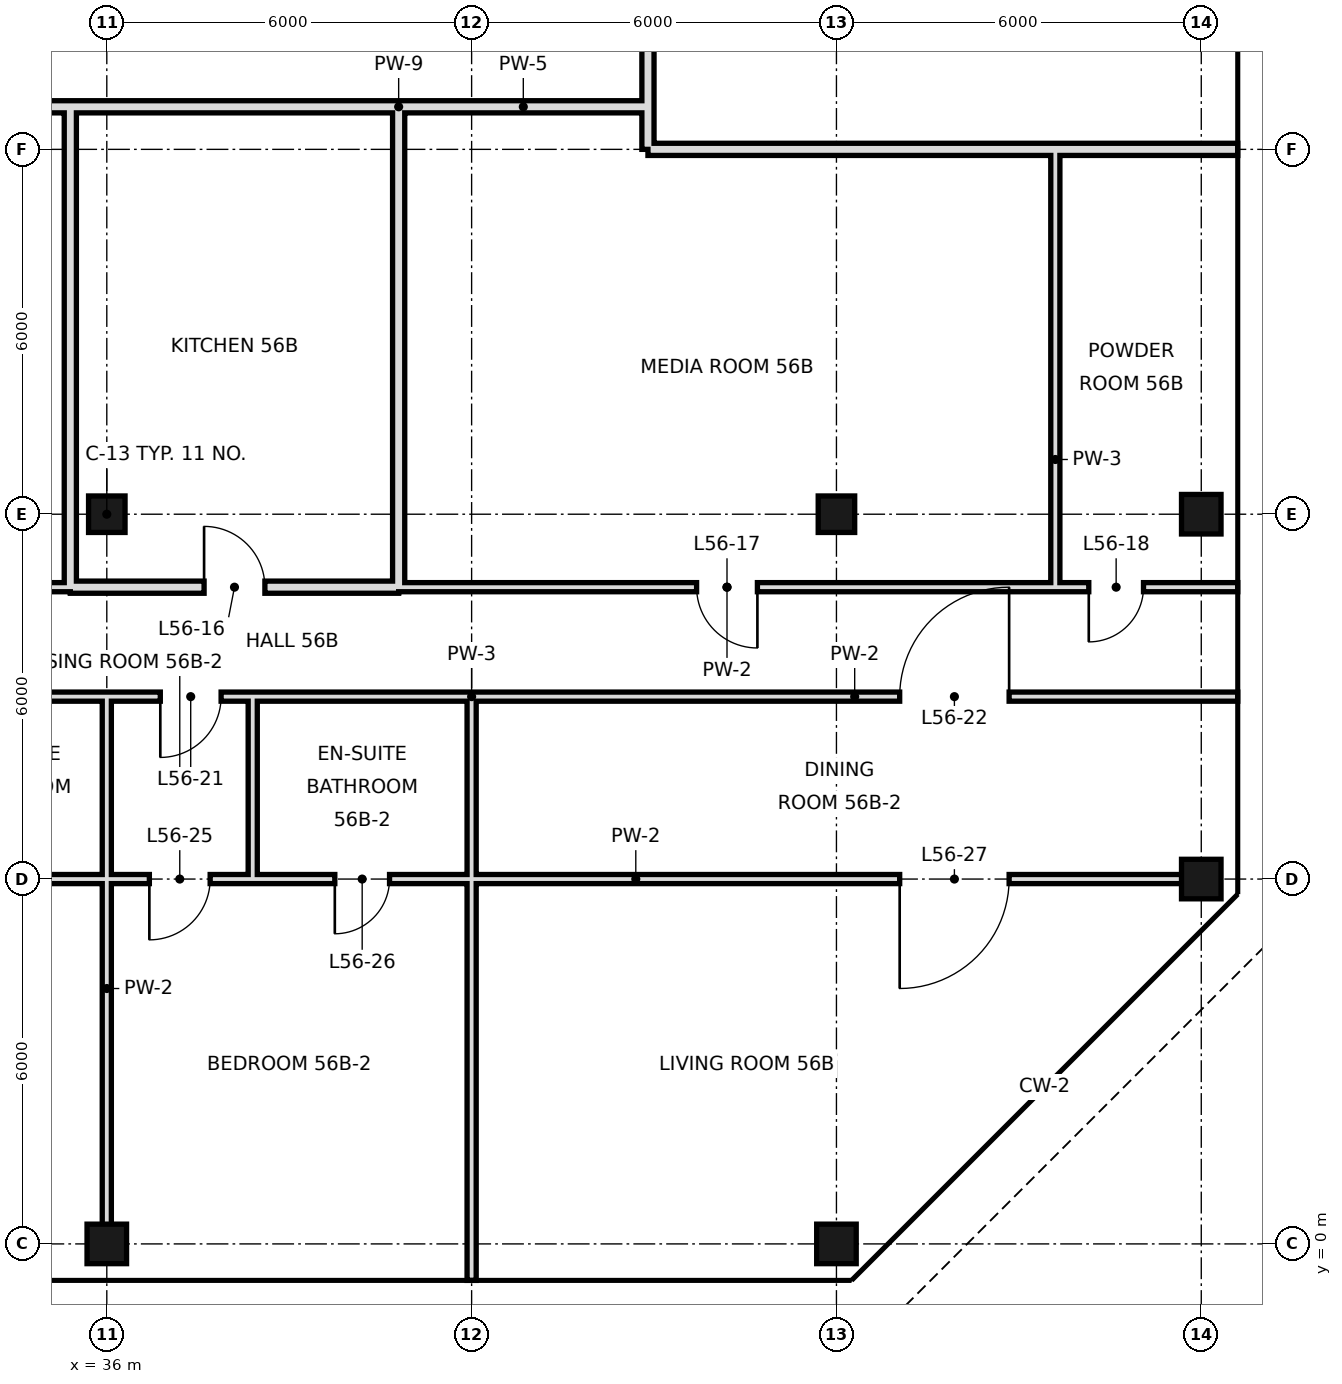
"""IFC4 building model, lengths in metres.
Left out: names, types, materials, properties, quantities, classifications, styles, units other than length and angle.
Written with IfcOpenShell. Run it as: python <this file> out.ifc"""

import sys

from ifc_helpers import new_model, si_unit, direction, frame, frame_2d, origin, origin_2d, place, context, subcontext, project, spatial, rectangle, hollow_rectangle, extrude, element, fill, save


model = new_model("IFC4")
c1 = context("Model", 3, precision=1e-05, world=origin(), true_north=direction((0.0, 1.0)))
c2 = subcontext(c1, "Body", "Model", "MODEL_VIEW")
j1 = project(units=[si_unit("LENGTHUNIT", "METRE"), si_unit("PLANEANGLEUNIT", "RADIAN")], contexts=[c1])
p1 = place(None, origin())
s1 = spatial("IfcSite", under=j1, at=p1, CompositionType="ELEMENT")
p2 = place(p1, origin())
s2 = spatial("IfcBuilding", under=s1, at=p2, CompositionType="ELEMENT")
p3 = place(p2, frame((0.0, 0.0, 239.6)))
s3 = spatial("IfcBuildingStorey", under=s2, at=p3, CompositionType="ELEMENT", Elevation=239.6)
p4 = place(p3, frame((36.0, 0.0, 0.0), z_axis=(0.0, 0.0, 1.0), x_axis=(1.0, 0.0, 0.0)))
e1 = element("IfcColumn", 1, at=p4, inside=s3, PredefinedType="COLUMN", context=c2, shape_type="SweptSolid", body=[
    extrude(hollow_rectangle(XDim=0.65, YDim=0.65, WallThickness=0.032, at=origin_2d()), origin(), (0.0, 0.0, 1.0), 3.6),
])
p5 = place(p3, frame((36.0, 12.0, 0.0), z_axis=(0.0, 0.0, 1.0), x_axis=(1.0, 0.0, 0.0)))
e2 = element("IfcColumn", 2, at=p5, inside=s3, PredefinedType="COLUMN", context=c2, shape_type="SweptSolid", body=[
    extrude(hollow_rectangle(XDim=0.6, YDim=0.6, WallThickness=0.028, at=origin_2d()), origin(), (0.0, 0.0, 1.0), 3.6),
])
p6 = place(p3, frame((48.0, 0.0, 0.0), z_axis=(0.0, 0.0, 1.0), x_axis=(1.0, 0.0, 0.0)))
e3 = element("IfcColumn", 3, at=p6, inside=s3, PredefinedType="COLUMN", context=c2, shape_type="SweptSolid", body=[
    extrude(hollow_rectangle(XDim=0.65, YDim=0.65, WallThickness=0.032, at=origin_2d()), origin(), (0.0, 0.0, 1.0), 3.6),
])
p7 = place(p3, frame((48.0, 12.0, 0.0), z_axis=(0.0, 0.0, 1.0), x_axis=(1.0, 0.0, 0.0)))
e4 = element("IfcColumn", 4, at=p7, inside=s3, PredefinedType="COLUMN", context=c2, shape_type="SweptSolid", body=[
    extrude(hollow_rectangle(XDim=0.6, YDim=0.6, WallThickness=0.028, at=origin_2d()), origin(), (0.0, 0.0, 1.0), 3.6),
])
for number, where, z_axis, x_axis in (
    (5, (54.0, 6.0, 0.0), (0.0, 0.0, 1.0), (1.0, 0.0, 0.0)),
    (6, (54.0, 12.0, 0.0), (0.0, 0.0, 1.0), (1.0, 0.0, 0.0)),
):
    element("IfcColumn", number, at=place(p3, frame(where, z_axis=z_axis, x_axis=x_axis)), inside=s3, PredefinedType="COLUMN", context=c2, shape_type="SweptSolid", body=[
        extrude(hollow_rectangle(XDim=0.65, YDim=0.65, WallThickness=0.032, at=origin_2d()), origin(), (0.0, 0.0, 1.0), 3.6),
    ])
p8 = place(p3, frame((35.4, 10.8, 0.0), z_axis=(0.0, 0.0, 1.0), x_axis=(0.0, 1.0, 0.0)))
e7 = element("IfcWall", 7, at=p8, inside=s3, PredefinedType="SOLIDWALL", context=c2, shape_type="SweptSolid", body=[
    extrude(rectangle(XDim=7.9, YDim=0.2, at=frame_2d((3.95, 0.0))), origin(), (0.0, 0.0, 1.0), 2.72),
])
p9 = place(p3, frame((36.0, 0.0, 0.0), z_axis=(0.0, 0.0, 1.0), x_axis=(0.0, 1.0, 0.0)))
e8 = element("IfcWall", 8, at=p9, inside=s3, PredefinedType="PARTITIONING", context=c2, shape_type="SweptSolid", body=[
    extrude(rectangle(XDim=6.0, YDim=0.15, at=frame_2d((3.0, 0.0))), origin(), (0.0, 0.0, 1.0), 2.72),
])
p10 = place(p3, frame((36.0, 6.0, 0.0), z_axis=(0.0, 0.0, 1.0), x_axis=(0.0, 1.0, 0.0)))
e9 = element("IfcWall", 9, at=p10, inside=s3, PredefinedType="PARTITIONING", context=c2, shape_type="SweptSolid", body=[
    extrude(rectangle(XDim=3.0, YDim=0.15, at=frame_2d((1.5, 0.0))), origin(), (0.0, 0.0, 1.0), 2.72),
])
p11 = place(p3, frame((38.4, 6.0, 0.0), z_axis=(0.0, 0.0, 1.0), x_axis=(0.0, 1.0, 0.0)))
e10 = element("IfcWall", 10, at=p11, inside=s3, PredefinedType="PARTITIONING", context=c2, shape_type="SweptSolid", body=[
    extrude(rectangle(XDim=3.0, YDim=0.15, at=frame_2d((1.5, 0.0))), origin(), (0.0, 0.0, 1.0), 3.42),
])
p12 = place(p3, frame((40.8, 10.8, 0.0), z_axis=(0.0, 0.0, 1.0), x_axis=(0.0, 1.0, 0.0)))
e11 = element("IfcWall", 11, at=p12, inside=s3, PredefinedType="SOLIDWALL", context=c2, shape_type="SweptSolid", body=[
    extrude(rectangle(XDim=7.9, YDim=0.2, at=frame_2d((3.95, 0.0))), origin(), (0.0, 0.0, 1.0), 2.72),
])
p13 = place(p3, frame((42.0, -0.6, 0.0), z_axis=(0.0, 0.0, 1.0), x_axis=(0.0, 1.0, 0.0)))
e12 = element("IfcWall", 12, at=p13, inside=s3, PredefinedType="PARTITIONING", context=c2, shape_type="SweptSolid", body=[
    extrude(rectangle(XDim=6.6, YDim=0.15, at=frame_2d((3.3, 0.0))), origin(), (0.0, 0.0, 1.0), 2.72),
])
p14 = place(p3, frame((42.0, 6.0, 0.0), z_axis=(0.0, 0.0, 1.0), x_axis=(0.0, 1.0, 0.0)))
e13 = element("IfcWall", 13, at=p14, inside=s3, PredefinedType="PARTITIONING", context=c2, shape_type="SweptSolid", body=[
    extrude(rectangle(XDim=3.0, YDim=0.15, at=frame_2d((1.5, 0.0))), origin(), (0.0, 0.0, 1.0), 2.72),
])
p15 = place(p3, frame((44.9, 18.0, 0.0), z_axis=(0.0, 0.0, 1.0), x_axis=(0.0, 1.0, 0.0)))
e14 = element("IfcWall", 14, at=p15, inside=s3, PredefinedType="SOLIDWALL", context=c2, shape_type="SweptSolid", body=[
    extrude(rectangle(XDim=30.6, YDim=0.2, at=frame_2d((15.3, 0.0))), origin(), (0.0, 0.0, 1.0), 2.72),
])
p16 = place(p15, frame((20.27, 0.0, 0.0)))
e15 = element("IfcOpeningElement", 15, at=p16, cuts=e14, PredefinedType="OPENING", context=c2, shape_type="SweptSolid", body=[
    extrude(rectangle(XDim=1.2, YDim=2.4, at=frame_2d((0.6, 1.2))), frame((0.0, 0.11, 0.0), z_axis=(0.0, -1.0, 0.0), x_axis=(1.0, 0.0, 0.0)), (0.0, 0.0, 1.0), 0.22),
])
p17 = place(p3, frame((51.6, 10.8, 0.0), z_axis=(0.0, 0.0, 1.0), x_axis=(0.0, 1.0, 0.0)))
e16 = element("IfcWall", 16, at=p17, inside=s3, PredefinedType="PARTITIONING", context=c2, shape_type="SweptSolid", body=[
    extrude(rectangle(XDim=7.2, YDim=0.15, at=frame_2d((3.6, 0.0))), origin(), (0.0, 0.0, 1.0), 3.42),
])
p18 = place(p3, frame((35.4, 10.8, 0.0), z_axis=(0.0, 0.0, 1.0), x_axis=(1.0, 0.0, 0.0)))
e17 = element("IfcWall", 17, at=p18, inside=s3, PredefinedType="SOLIDWALL", context=c2, shape_type="SweptSolid", body=[
    extrude(rectangle(XDim=5.4, YDim=0.2, at=frame_2d((2.7, 0.0))), origin(), (0.0, 0.0, 1.0), 2.72),
])
p19 = place(p18, frame((2.2, 0.0, 0.0)))
e18 = element("IfcOpeningElement", 18, at=p19, cuts=e17, PredefinedType="OPENING", context=c2, shape_type="SweptSolid", body=[
    extrude(rectangle(XDim=1.0, YDim=2.4, at=frame_2d((0.5, 1.2))), frame((0.0, 0.11, 0.0), z_axis=(0.0, -1.0, 0.0), x_axis=(1.0, 0.0, 0.0)), (0.0, 0.0, 1.0), 0.22),
])
p20 = place(p3, frame((6.0, 10.8, 0.0), z_axis=(0.0, 0.0, 1.0), x_axis=(1.0, 0.0, 0.0)))
e19 = element("IfcWall", 19, at=p20, inside=s3, PredefinedType="PARTITIONING", context=c2, shape_type="SweptSolid", body=[
    extrude(rectangle(XDim=29.4, YDim=0.15, at=frame_2d((14.7, 0.0))), origin(), (0.0, 0.0, 1.0), 3.42),
])
p21 = place(p20, frame((3.4, 0.0, 0.0)))
e20 = element("IfcOpeningElement", 20, at=p21, cuts=e19, PredefinedType="OPENING", context=c2, shape_type="SweptSolid", body=[
    extrude(rectangle(XDim=1.0, YDim=2.4, at=frame_2d((0.5, 1.2))), frame((0.0, 0.085, 0.0), z_axis=(0.0, -1.0, 0.0), x_axis=(1.0, 0.0, 0.0)), (0.0, 0.0, 1.0), 0.17),
])
p22 = place(p20, frame((9.4, 0.0, 0.0)))
e21 = element("IfcOpeningElement", 21, at=p22, cuts=e19, PredefinedType="OPENING", context=c2, shape_type="SweptSolid", body=[
    extrude(rectangle(XDim=1.0, YDim=2.4, at=frame_2d((0.5, 1.2))), frame((0.0, 0.085, 0.0), z_axis=(0.0, -1.0, 0.0), x_axis=(1.0, 0.0, 0.0)), (0.0, 0.0, 1.0), 0.17),
])
p23 = place(p20, frame((19.3, 0.0, 0.0)))
e22 = element("IfcOpeningElement", 22, at=p23, cuts=e19, PredefinedType="OPENING", context=c2, shape_type="SweptSolid", body=[
    extrude(rectangle(XDim=1.0, YDim=2.4, at=frame_2d((0.5, 1.2))), frame((0.0, 0.085, 0.0), z_axis=(0.0, -1.0, 0.0), x_axis=(1.0, 0.0, 0.0)), (0.0, 0.0, 1.0), 0.17),
])
p24 = place(p20, frame((25.0, 0.0, 0.0)))
e23 = element("IfcOpeningElement", 23, at=p24, cuts=e19, PredefinedType="OPENING", context=c2, shape_type="SweptSolid", body=[
    extrude(rectangle(XDim=1.0, YDim=2.4, at=frame_2d((0.5, 1.2))), frame((0.0, 0.085, 0.0), z_axis=(0.0, -1.0, 0.0), x_axis=(1.0, 0.0, 0.0)), (0.0, 0.0, 1.0), 0.17),
])
p25 = place(p3, frame((40.8, 10.8, 0.0), z_axis=(0.0, 0.0, 1.0), x_axis=(1.0, 0.0, 0.0)))
e24 = element("IfcWall", 24, at=p25, inside=s3, PredefinedType="PARTITIONING", context=c2, shape_type="SweptSolid", body=[
    extrude(rectangle(XDim=10.8, YDim=0.15, at=frame_2d((5.4, 0.0))), origin(), (0.0, 0.0, 1.0), 3.42),
])
p26 = place(p25, frame((4.9, 0.0, 0.0)))
e25 = element("IfcOpeningElement", 25, at=p26, cuts=e24, PredefinedType="OPENING", context=c2, shape_type="SweptSolid", body=[
    extrude(rectangle(XDim=1.0, YDim=2.4, at=frame_2d((0.5, 1.2))), frame((0.0, 0.085, 0.0), z_axis=(0.0, -1.0, 0.0), x_axis=(1.0, 0.0, 0.0)), (0.0, 0.0, 1.0), 0.17),
])
p27 = place(p3, frame((51.6, 10.8, 0.0), z_axis=(0.0, 0.0, 1.0), x_axis=(1.0, 0.0, 0.0)))
e26 = element("IfcWall", 26, at=p27, inside=s3, PredefinedType="PARTITIONING", context=c2, shape_type="SweptSolid", body=[
    extrude(rectangle(XDim=3.0, YDim=0.15, at=frame_2d((1.5, 0.0))), origin(), (0.0, 0.0, 1.0), 3.42),
])
p28 = place(p27, frame((0.55, 0.0, 0.0)))
e27 = element("IfcOpeningElement", 27, at=p28, cuts=e26, PredefinedType="OPENING", context=c2, shape_type="SweptSolid", body=[
    extrude(rectangle(XDim=0.9, YDim=2.4, at=frame_2d((0.45, 1.2))), frame((0.0, 0.085, 0.0), z_axis=(0.0, -1.0, 0.0), x_axis=(1.0, 0.0, 0.0)), (0.0, 0.0, 1.0), 0.17),
])
p29 = place(p3, frame((44.9, 18.0, 0.0), z_axis=(0.0, 0.0, 1.0), x_axis=(1.0, 0.0, 0.0)))
e28 = element("IfcWall", 28, at=p29, inside=s3, PredefinedType="SOLIDWALL", context=c2, shape_type="SweptSolid", body=[
    extrude(rectangle(XDim=9.7, YDim=0.2, at=frame_2d((4.85, 0.0))), origin(), (0.0, 0.0, 1.0), 2.72),
])
p30 = place(p3, frame((6.0, 18.7, 0.0), z_axis=(0.0, 0.0, 1.0), x_axis=(1.0, 0.0, 0.0)))
e29 = element("IfcWall", 29, at=p30, inside=s3, PredefinedType="SOLIDWALL", context=c2, shape_type="SweptSolid", body=[
    extrude(rectangle(XDim=29.4, YDim=0.2, at=frame_2d((14.7, 0.0))), origin(), (0.0, 0.0, 1.0), 2.72),
])
p31 = place(p30, frame((1.54, 0.0, 0.0)))
e30 = element("IfcOpeningElement", 30, at=p31, cuts=e29, PredefinedType="OPENING", context=c2, shape_type="SweptSolid", body=[
    extrude(rectangle(XDim=1.2, YDim=2.4, at=frame_2d((0.6, 1.2))), frame((0.0, 0.11, 0.0), z_axis=(0.0, -1.0, 0.0), x_axis=(1.0, 0.0, 0.0)), (0.0, 0.0, 1.0), 0.22),
])
p32 = place(p30, frame((19.58, 0.0, 0.0)))
e31 = element("IfcOpeningElement", 31, at=p32, cuts=e29, PredefinedType="OPENING", context=c2, shape_type="SweptSolid", body=[
    extrude(rectangle(XDim=1.2, YDim=2.4, at=frame_2d((0.6, 1.2))), frame((0.0, 0.11, 0.0), z_axis=(0.0, -1.0, 0.0), x_axis=(1.0, 0.0, 0.0)), (0.0, 0.0, 1.0), 0.22),
])
p33 = place(p3, frame((40.8, 18.7, 0.0), z_axis=(0.0, 0.0, 1.0), x_axis=(1.0, 0.0, 0.0)))
e32 = element("IfcWall", 32, at=p33, inside=s3, PredefinedType="SOLIDWALL", context=c2, shape_type="SweptSolid", body=[
    extrude(rectangle(XDim=4.1, YDim=0.2, at=frame_2d((2.05, 0.0))), origin(), (0.0, 0.0, 1.0), 2.72),
])
p34 = place(p3, frame((35.4, 18.7, 0.0), z_axis=(0.0, 0.0, 1.0), x_axis=(1.0, 0.0, 0.0)))
e33 = element("IfcWall", 33, at=p34, inside=s3, PredefinedType="SOLIDWALL", context=c2, shape_type="SweptSolid", body=[
    extrude(rectangle(XDim=5.4, YDim=0.2, at=frame_2d((2.7, 0.0))), origin(), (0.0, 0.0, 1.0), 3.42),
])
p35 = place(p3, frame((36.0, 6.0, 0.0), z_axis=(0.0, 0.0, 1.0), x_axis=(1.0, 0.0, 0.0)))
e34 = element("IfcWall", 34, at=p35, inside=s3, PredefinedType="PARTITIONING", context=c2, shape_type="SweptSolid", body=[
    extrude(rectangle(XDim=2.4, YDim=0.15, at=frame_2d((1.2, 0.0))), origin(), (0.0, 0.0, 1.0), 2.97),
])
p36 = place(p35, frame((0.7, 0.0, 0.0)))
e35 = element("IfcOpeningElement", 35, at=p36, cuts=e34, PredefinedType="OPENING", context=c2, shape_type="SweptSolid", body=[
    extrude(rectangle(XDim=1.0, YDim=2.4, at=frame_2d((0.5, 1.2))), frame((0.0, 0.085, 0.0), z_axis=(0.0, -1.0, 0.0), x_axis=(1.0, 0.0, 0.0)), (0.0, 0.0, 1.0), 0.17),
])
p37 = place(p3, frame((42.0, 6.0, 0.0), z_axis=(0.0, 0.0, 1.0), x_axis=(1.0, 0.0, 0.0)))
e36 = element("IfcWall", 36, at=p37, inside=s3, PredefinedType="PARTITIONING", context=c2, shape_type="SweptSolid", body=[
    extrude(rectangle(XDim=12.0, YDim=0.15, at=frame_2d((6.0, 0.0))), origin(), (0.0, 0.0, 1.0), 2.97),
])
p38 = place(p37, frame((7.04, 0.0, 0.0)))
e37 = element("IfcOpeningElement", 37, at=p38, cuts=e36, PredefinedType="OPENING", context=c2, shape_type="SweptSolid", body=[
    extrude(rectangle(XDim=1.8, YDim=2.4, at=frame_2d((0.9, 1.2))), frame((0.0, 0.085, 0.0), z_axis=(0.0, -1.0, 0.0), x_axis=(1.0, 0.0, 0.0)), (0.0, 0.0, 1.0), 0.17),
])
p39 = place(p3, frame((33.0, 6.0, 0.0), z_axis=(0.0, 0.0, 1.0), x_axis=(1.0, 0.0, 0.0)))
e38 = element("IfcWall", 38, at=p39, inside=s3, PredefinedType="PARTITIONING", context=c2, shape_type="SweptSolid", body=[
    extrude(rectangle(XDim=3.0, YDim=0.15, at=frame_2d((1.5, 0.0))), origin(), (0.0, 0.0, 1.0), 2.97),
])
p40 = place(p39, frame((0.73, 0.0, 0.0)))
e39 = element("IfcOpeningElement", 39, at=p40, cuts=e38, PredefinedType="OPENING", context=c2, shape_type="SweptSolid", body=[
    extrude(rectangle(XDim=0.9, YDim=2.4, at=frame_2d((0.45, 1.2))), frame((0.0, 0.085, 0.0), z_axis=(0.0, -1.0, 0.0), x_axis=(1.0, 0.0, 0.0)), (0.0, 0.0, 1.0), 0.17),
])
p41 = place(p3, frame((38.4, 6.0, 0.0), z_axis=(0.0, 0.0, 1.0), x_axis=(1.0, 0.0, 0.0)))
e40 = element("IfcWall", 40, at=p41, inside=s3, PredefinedType="PARTITIONING", context=c2, shape_type="SweptSolid", body=[
    extrude(rectangle(XDim=3.6, YDim=0.15, at=frame_2d((1.8, 0.0))), origin(), (0.0, 0.0, 1.0), 2.97),
])
p42 = place(p41, frame((1.35, 0.0, 0.0)))
e41 = element("IfcOpeningElement", 41, at=p42, cuts=e40, PredefinedType="OPENING", context=c2, shape_type="SweptSolid", body=[
    extrude(rectangle(XDim=0.9, YDim=2.4, at=frame_2d((0.45, 1.2))), frame((0.0, 0.085, 0.0), z_axis=(0.0, -1.0, 0.0), x_axis=(1.0, 0.0, 0.0)), (0.0, 0.0, 1.0), 0.17),
])
p43 = place(p3, frame((36.0, 9.0, 0.0), z_axis=(0.0, 0.0, 1.0), x_axis=(1.0, 0.0, 0.0)))
e42 = element("IfcWall", 42, at=p43, inside=s3, PredefinedType="PARTITIONING", context=c2, shape_type="SweptSolid", body=[
    extrude(rectangle(XDim=2.4, YDim=0.15, at=frame_2d((1.2, 0.0))), origin(), (0.0, 0.0, 1.0), 3.42),
])
p44 = place(p43, frame((0.88, 0.0, 0.0)))
e43 = element("IfcOpeningElement", 43, at=p44, cuts=e42, PredefinedType="OPENING", context=c2, shape_type="SweptSolid", body=[
    extrude(rectangle(XDim=1.0, YDim=2.4, at=frame_2d((0.5, 1.2))), frame((0.0, 0.085, 0.0), z_axis=(0.0, -1.0, 0.0), x_axis=(1.0, 0.0, 0.0)), (0.0, 0.0, 1.0), 0.17),
])
p45 = place(p3, frame((42.0, 9.0, 0.0), z_axis=(0.0, 0.0, 1.0), x_axis=(1.0, 0.0, 0.0)))
e44 = element("IfcWall", 44, at=p45, inside=s3, PredefinedType="PARTITIONING", context=c2, shape_type="SweptSolid", body=[
    extrude(rectangle(XDim=12.6, YDim=0.15, at=frame_2d((6.3, 0.0))), origin(), (0.0, 0.0, 1.0), 3.42),
])
p46 = place(p45, frame((7.04, 0.0, 0.0)))
e45 = element("IfcOpeningElement", 45, at=p46, cuts=e44, PredefinedType="OPENING", context=c2, shape_type="SweptSolid", body=[
    extrude(rectangle(XDim=1.8, YDim=2.4, at=frame_2d((0.9, 1.2))), frame((0.0, 0.085, 0.0), z_axis=(0.0, -1.0, 0.0), x_axis=(1.0, 0.0, 0.0)), (0.0, 0.0, 1.0), 0.17),
])
p47 = place(p3, frame((33.0, 9.0, 0.0), z_axis=(0.0, 0.0, 1.0), x_axis=(1.0, 0.0, 0.0)))
e46 = element("IfcWall", 46, at=p47, inside=s3, PredefinedType="PARTITIONING", context=c2, shape_type="SweptSolid", body=[
    extrude(rectangle(XDim=3.0, YDim=0.15, at=frame_2d((1.5, 0.0))), origin(), (0.0, 0.0, 1.0), 3.42),
])
p48 = place(p3, frame((38.4, 9.0, 0.0), z_axis=(0.0, 0.0, 1.0), x_axis=(1.0, 0.0, 0.0)))
e47 = element("IfcWall", 47, at=p48, inside=s3, PredefinedType="PARTITIONING", context=c2, shape_type="SweptSolid", body=[
    extrude(rectangle(XDim=3.6, YDim=0.15, at=frame_2d((1.8, 0.0))), origin(), (0.0, 0.0, 1.0), 3.42),
])
p49 = place(p19, origin())
e48 = element("IfcDoor", 48, at=p49, inside=s3, OperationType="SINGLE_SWING_LEFT", PredefinedType="DOOR", context=c2, shape_type="SweptSolid", body=[
    extrude(rectangle(XDim=1.0, YDim=2.4, at=frame_2d((0.5, 1.2))), frame((0.0, 0.025, 0.0), z_axis=(0.0, -1.0, 0.0), x_axis=(1.0, 0.0, 0.0)), (0.0, 0.0, 1.0), 0.05),
])
fill(e18, e48)
p50 = place(p26, origin())
e49 = element("IfcDoor", 49, at=p50, inside=s3, OperationType="SINGLE_SWING_RIGHT", PredefinedType="DOOR", context=c2, shape_type="SweptSolid", body=[
    extrude(rectangle(XDim=1.0, YDim=2.4, at=frame_2d((0.5, 1.2))), frame((0.0, 0.025, 0.0), z_axis=(0.0, -1.0, 0.0), x_axis=(1.0, 0.0, 0.0)), (0.0, 0.0, 1.0), 0.05),
])
fill(e25, e49)
p51 = place(p28, frame((0.9, 0.0, 0.0), z_axis=(0.0, 0.0, 1.0), x_axis=(-1.0, 0.0, 0.0)))
e50 = element("IfcDoor", 50, at=p51, inside=s3, OperationType="SINGLE_SWING_RIGHT", PredefinedType="DOOR", context=c2, shape_type="SweptSolid", body=[
    extrude(rectangle(XDim=0.9, YDim=2.4, at=frame_2d((0.45, 1.2))), frame((0.0, 0.025, 0.0), z_axis=(0.0, -1.0, 0.0), x_axis=(1.0, 0.0, 0.0)), (0.0, 0.0, 1.0), 0.05),
])
fill(e27, e50)
p52 = place(p44, frame((1.0, 0.0, 0.0), z_axis=(0.0, 0.0, 1.0), x_axis=(-1.0, 0.0, 0.0)))
e51 = element("IfcDoor", 51, at=p52, inside=s3, OperationType="SINGLE_SWING_RIGHT", PredefinedType="DOOR", context=c2, shape_type="SweptSolid", body=[
    extrude(rectangle(XDim=1.0, YDim=2.4, at=frame_2d((0.5, 1.2))), frame((0.0, 0.025, 0.0), z_axis=(0.0, -1.0, 0.0), x_axis=(1.0, 0.0, 0.0)), (0.0, 0.0, 1.0), 0.05),
])
fill(e43, e51)
p53 = place(p46, frame((1.8, 0.0, 0.0), z_axis=(0.0, 0.0, 1.0), x_axis=(-1.0, 0.0, 0.0)))
e52 = element("IfcDoor", 52, at=p53, inside=s3, OperationType="SINGLE_SWING_LEFT", PredefinedType="DOOR", context=c2, shape_type="SweptSolid", body=[
    extrude(rectangle(XDim=1.8, YDim=2.4, at=frame_2d((0.9, 1.2))), frame((0.0, 0.025, 0.0), z_axis=(0.0, -1.0, 0.0), x_axis=(1.0, 0.0, 0.0)), (0.0, 0.0, 1.0), 0.05),
])
fill(e45, e52)
p54 = place(p36, frame((1.0, 0.0, 0.0), z_axis=(0.0, 0.0, 1.0), x_axis=(-1.0, 0.0, 0.0)))
e53 = element("IfcDoor", 53, at=p54, inside=s3, OperationType="SINGLE_SWING_RIGHT", PredefinedType="DOOR", context=c2, shape_type="SweptSolid", body=[
    extrude(rectangle(XDim=1.0, YDim=2.4, at=frame_2d((0.5, 1.2))), frame((0.0, 0.025, 0.0), z_axis=(0.0, -1.0, 0.0), x_axis=(1.0, 0.0, 0.0)), (0.0, 0.0, 1.0), 0.05),
])
fill(e35, e53)
p55 = place(p42, frame((0.9, 0.0, 0.0), z_axis=(0.0, 0.0, 1.0), x_axis=(-1.0, 0.0, 0.0)))
e54 = element("IfcDoor", 54, at=p55, inside=s3, OperationType="SINGLE_SWING_RIGHT", PredefinedType="DOOR", context=c2, shape_type="SweptSolid", body=[
    extrude(rectangle(XDim=0.9, YDim=2.4, at=frame_2d((0.45, 1.2))), frame((0.0, 0.025, 0.0), z_axis=(0.0, -1.0, 0.0), x_axis=(1.0, 0.0, 0.0)), (0.0, 0.0, 1.0), 0.05),
])
fill(e41, e54)
p56 = place(p38, frame((1.8, 0.0, 0.0), z_axis=(0.0, 0.0, 1.0), x_axis=(-1.0, 0.0, 0.0)))
e55 = element("IfcDoor", 55, at=p56, inside=s3, OperationType="SINGLE_SWING_RIGHT", PredefinedType="DOOR", context=c2, shape_type="SweptSolid", body=[
    extrude(rectangle(XDim=1.8, YDim=2.4, at=frame_2d((0.9, 1.2))), frame((0.0, 0.025, 0.0), z_axis=(0.0, -1.0, 0.0), x_axis=(1.0, 0.0, 0.0)), (0.0, 0.0, 1.0), 0.05),
])
fill(e37, e55)
save(model, sys.argv[1])
